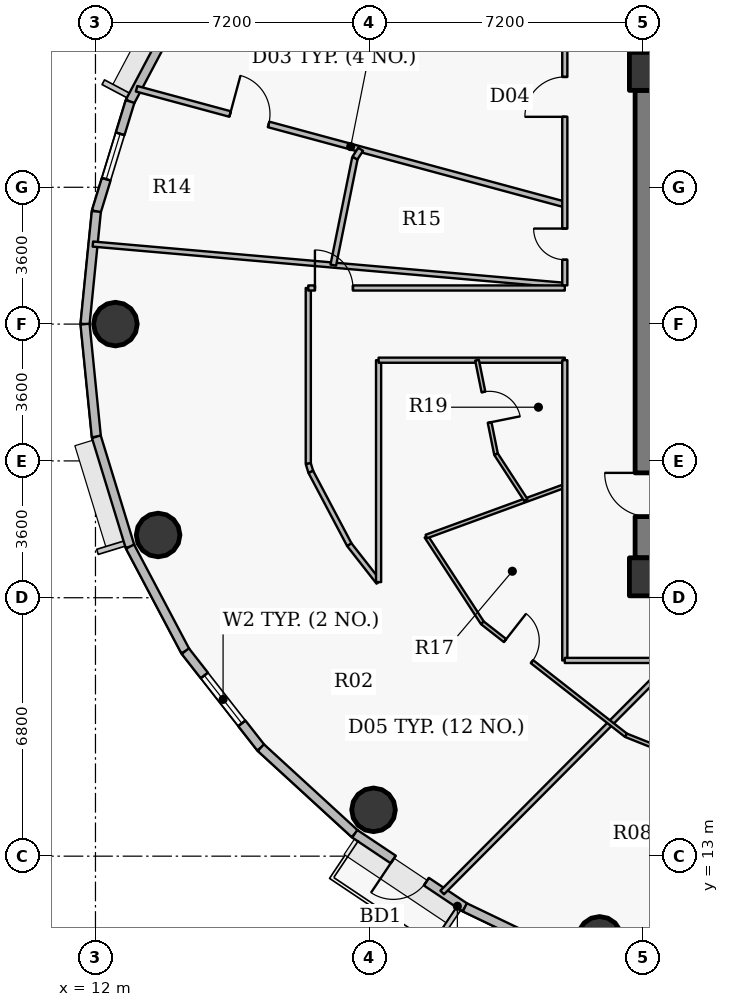
"""IFC4 building model, lengths in metres.
Left out: names, types, materials, properties, quantities, classifications, styles, units other than length and angle.
Written with IfcOpenShell. Run it as: python <this file> out.ifc"""

import sys

from ifc_helpers import new_model, si_unit, direction, frame, frame_2d, origin, origin_2d, place, context, subcontext, project, spatial, rectangle, hollow_circle, extrude, source, transform, mapped, element, fill, save


model = new_model("IFC4")
c1 = context("Model", 3, precision=1e-05, world=origin(), true_north=direction((0.0, 1.0)))
c2 = subcontext(c1, "Body", "Model", "MODEL_VIEW")
j1 = project(units=[si_unit("LENGTHUNIT", "METRE"), si_unit("PLANEANGLEUNIT", "RADIAN")], contexts=[c1])
p1 = place(None, origin())
s1 = spatial("IfcSite", under=j1, at=p1, CompositionType="ELEMENT")
p2 = place(p1, origin())
s2 = spatial("IfcBuilding", under=s1, at=p2, CompositionType="ELEMENT")
p3 = place(p2, frame((0.0, 0.0, 244.05)))
s3 = spatial("IfcBuildingStorey", under=s2, at=p3, CompositionType="ELEMENT", Elevation=244.05)
for number, where, z_axis, x_axis in (
    (1, (26.55, 20.35, 0.0), (0.0, 0.0, 1.0), (1.0, 0.0, 0.0)),
    (2, (26.55, 33.65, 0.0), (0.0, 0.0, 1.0), (1.0, 0.0, 0.0)),
):
    element("IfcColumn", number, at=place(p3, frame(where, z_axis=z_axis, x_axis=x_axis)), inside=s3, PredefinedType="COLUMN", context=c2, shape_type="SweptSolid", body=[
        extrude(rectangle(XDim=1.0, YDim=1.0, at=origin_2d()), origin(), (0.0, 0.0, 1.0), 3.75),
    ])
p4 = place(p3, frame((26.55, 20.85, 0.0), z_axis=(0.0, 0.0, 1.0), x_axis=(0.0, 1.0, 0.0)))
e3 = element("IfcWall", 3, at=p4, inside=s3, PredefinedType="SHEAR", context=c2, shape_type="SweptSolid", body=[
    extrude(rectangle(XDim=12.3, YDim=0.7, at=frame_2d((6.15, 0.0))), origin(), (0.0, 0.0, 1.0), 3.05),
])
p5 = place(p4, frame((1.085, 0.0, 0.0)))
e4 = element("IfcOpeningElement", 4, at=p5, cuts=e3, PredefinedType="OPENING", context=c2, shape_type="SweptSolid", body=[
    extrude(rectangle(XDim=1.15, YDim=2.15, at=origin_2d()), frame((0.575, 0.36, 1.075), z_axis=(0.0, -1.0, 0.0), x_axis=(1.0, 0.0, 0.0)), (0.0, 0.0, 1.0), 0.72),
])
for number, where, z_axis, x_axis in (
    (5, (12.525, 27.0, 0.0), (0.0, 0.0, 1.0), (1.0, 0.0, 0.0)),
    (6, (13.649, 21.451, 0.0), (0.0, 0.0, 1.0), (1.0, 0.0, 0.0)),
    (7, (19.317, 14.219, 0.0), (0.0, 0.0, 1.0), (1.0, 0.0, 0.0)),
    (8, (25.265, 10.836, 0.0), (0.0, 0.0, 1.0), (1.0, 0.0, 0.0)),
):
    element("IfcColumn", number, at=place(p3, frame(where, z_axis=z_axis, x_axis=x_axis)), inside=s3, PredefinedType="COLUMN", context=c2, shape_type="SweptSolid", body=[
        extrude(hollow_circle(Radius=0.575, WallThickness=0.036, at=origin_2d()), origin(), (0.0, 0.0, 1.0), 3.75),
    ])
p6 = place(p3, frame((12.91, 32.856, 0.0), z_axis=(0.0, 0.0, 1.0), x_axis=(0.46766049993, 0.883908172157, 0.0)))
e9 = element("IfcWall", 9, at=p6, inside=s3, PredefinedType="SOLIDWALL", context=c2, shape_type="SweptSolid", body=[
    extrude(rectangle(XDim=3.11, YDim=0.24, at=frame_2d((1.555, 0.0))), origin(), (0.0, 0.0, 1.0), 3.5),
])
p7 = place(p3, frame((12.023, 29.964, 0.0), z_axis=(0.0, 0.0, 1.0), x_axis=(0.293132907334, 0.95607170162, 0.0)))
e10 = element("IfcWall", 10, at=p7, inside=s3, PredefinedType="SOLIDWALL", context=c2, shape_type="SweptSolid", body=[
    extrude(rectangle(XDim=3.025, YDim=0.24, at=frame_2d((1.512, 0.0))), origin(), (0.0, 0.0, 1.0), 3.5),
])
p8 = place(p7, frame((0.887, 0.0, 0.9)))
e11 = element("IfcOpeningElement", 11, at=p8, cuts=e10, PredefinedType="OPENING", context=c2, shape_type="SweptSolid", body=[
    extrude(rectangle(XDim=1.25, YDim=1.65, at=origin_2d()), frame((0.625, 0.13, 0.825), z_axis=(0.0, -1.0, 0.0), x_axis=(1.0, 0.0, 0.0)), (0.0, 0.0, 1.0), 0.26),
])
for number, where, z_axis, x_axis in (
    (12, (11.725, 27.0, 0.0), (0.0, 0.0, 1.0), (0.1, 0.995, 0.0)),
    (13, (12.023, 24.036, 0.0), (0.0, 0.0, 1.0), (-0.1, 0.995, 0.0)),
):
    element("IfcWall", number, at=place(p3, frame(where, z_axis=z_axis, x_axis=x_axis)), inside=s3, PredefinedType="SOLIDWALL", context=c2, shape_type="SweptSolid", body=[
        extrude(rectangle(XDim=2.979, YDim=0.24, at=frame_2d((1.489, 0.0))), origin(), (0.0, 0.0, 1.0), 3.5),
    ])
p9 = place(p3, frame((12.91, 21.144, 0.0), z_axis=(0.0, 0.0, 1.0), x_axis=(-0.293132907334, 0.95607170162, 0.0)))
e14 = element("IfcWall", 14, at=p9, inside=s3, PredefinedType="SOLIDWALL", context=c2, shape_type="SweptSolid", body=[
    extrude(rectangle(XDim=3.025, YDim=0.24, at=frame_2d((1.512, 0.0))), origin(), (0.0, 0.0, 1.0), 3.5),
])
p10 = place(p3, frame((14.364, 18.395, 0.0), z_axis=(0.0, 0.0, 1.0), x_axis=(-0.46766049993, 0.883908172157, 0.0)))
e15 = element("IfcWall", 15, at=p10, inside=s3, PredefinedType="SOLIDWALL", context=c2, shape_type="SweptSolid", body=[
    extrude(rectangle(XDim=3.11, YDim=0.24, at=frame_2d((1.555, 0.0))), origin(), (0.0, 0.0, 1.0), 3.5),
])
p11 = place(p3, frame((16.352, 15.855, 0.0), z_axis=(0.0, 0.0, 1.0), x_axis=(-0.616312344705, 0.787501805562, 0.0)))
e16 = element("IfcWall", 16, at=p11, inside=s3, PredefinedType="SOLIDWALL", context=c2, shape_type="SweptSolid", body=[
    extrude(rectangle(XDim=3.225, YDim=0.24, at=frame_2d((1.612, 0.0))), origin(), (0.0, 0.0, 1.0), 3.5),
])
p12 = place(p11, frame((0.812, 0.0, 0.9)))
e17 = element("IfcOpeningElement", 17, at=p12, cuts=e16, PredefinedType="OPENING", context=c2, shape_type="SweptSolid", body=[
    extrude(rectangle(XDim=1.6, YDim=1.75, at=origin_2d()), frame((0.8, 0.13, 0.875), z_axis=(0.0, -1.0, 0.0), x_axis=(1.0, 0.0, 0.0)), (0.0, 0.0, 1.0), 0.26),
])
p13 = place(p3, frame((18.824, 13.589, 0.0), z_axis=(0.0, 0.0, 1.0), x_axis=(-0.737123922599, 0.675757591694, 0.0)))
e18 = element("IfcWall", 18, at=p13, inside=s3, PredefinedType="SOLIDWALL", context=c2, shape_type="SweptSolid", body=[
    extrude(rectangle(XDim=3.354, YDim=0.24, at=frame_2d((1.677, 0.0))), origin(), (0.0, 0.0, 1.0), 3.5),
])
p14 = place(p3, frame((21.72, 11.652, 0.0), z_axis=(0.0, 0.0, 1.0), x_axis=(-0.831262496074, 0.555880079352, 0.0)))
e19 = element("IfcWall", 19, at=p14, inside=s3, PredefinedType="SOLIDWALL", context=c2, shape_type="SweptSolid", body=[
    extrude(rectangle(XDim=3.484, YDim=0.24, at=frame_2d((1.742, 0.0))), origin(), (0.0, 0.0, 1.0), 3.5),
])
p15 = place(p14, frame((1.217, 0.0, 0.0)))
e20 = element("IfcOpeningElement", 20, at=p15, cuts=e19, PredefinedType="OPENING", context=c2, shape_type="SweptSolid", body=[
    extrude(rectangle(XDim=1.05, YDim=2.15, at=origin_2d()), frame((0.525, 0.13, 1.075), z_axis=(0.0, -1.0, 0.0), x_axis=(1.0, 0.0, 0.0)), (0.0, 0.0, 1.0), 0.26),
])
p16 = place(p3, frame((24.969, 10.094, 0.0), z_axis=(0.0, 0.0, 1.0), x_axis=(-0.901598104751, 0.432574684313, 0.0)))
e21 = element("IfcWall", 21, at=p16, inside=s3, PredefinedType="SOLIDWALL", context=c2, shape_type="SweptSolid", body=[
    extrude(rectangle(XDim=3.604, YDim=0.24, at=frame_2d((1.802, 0.0))), origin(), (0.0, 0.0, 1.0), 3.5),
])
p17 = place(p3, frame((11.932, 29.106, 0.0), z_axis=(0.0, 0.0, 1.0), x_axis=(0.996194886619, -0.08715358784, 0.0)))
e22 = element("IfcWall", 22, at=p17, inside=s3, PredefinedType="PARTITIONING", context=c2, shape_type="SweptSolid", body=[
    extrude(rectangle(XDim=12.466, YDim=0.135, at=frame_2d((6.233, 0.0))), origin(), (0.0, 0.0, 1.0), 2.985),
])
p18 = place(p3, frame((13.082, 33.192, 0.0), z_axis=(0.0, 0.0, 1.0), x_axis=(0.965379480797, -0.26084949311, 0.0)))
e23 = element("IfcWall", 23, at=p18, inside=s3, PredefinedType="PARTITIONING", context=c2, shape_type="SweptSolid", body=[
    extrude(rectangle(XDim=11.672, YDim=0.15, at=frame_2d((5.836, 0.0))), origin(), (0.0, 0.0, 1.0), 2.985),
])
p19 = place(p18, frame((2.549, 0.0, 0.0)))
e24 = element("IfcOpeningElement", 24, at=p19, cuts=e23, PredefinedType="OPENING", context=c2, shape_type="SweptSolid", body=[
    extrude(rectangle(XDim=1.05, YDim=2.15, at=origin_2d()), frame((0.525, 0.085, 1.075), z_axis=(0.0, -1.0, 0.0), x_axis=(1.0, 0.0, 0.0)), (0.0, 0.0, 1.0), 0.17),
])
p20 = place(p3, frame((17.6, 23.328, 0.0), z_axis=(0.0, 0.0, 1.0), x_axis=(0.0, 1.0, 0.0)))
e25 = element("IfcWall", 25, at=p20, inside=s3, PredefinedType="PARTITIONING", context=c2, shape_type="SweptSolid", body=[
    extrude(rectangle(XDim=4.622, YDim=0.135, at=frame_2d((2.311, 0.0))), origin(), (0.0, 0.0, 1.0), 2.935),
])
p21 = place(p3, frame((17.6, 23.328, 0.0), z_axis=(0.0, 0.0, 1.0), x_axis=(0.292875000845, -0.956150738053, 0.0)))
e26 = element("IfcWall", 26, at=p21, inside=s3, PredefinedType="PARTITIONING", context=c2, shape_type="SweptSolid", body=[
    extrude(rectangle(XDim=0.227, YDim=0.135, at=frame_2d((0.113, 0.0))), origin(), (0.0, 0.0, 1.0), 3.5),
])
p22 = place(p3, frame((17.6, 27.95, 0.0), z_axis=(0.0, 0.0, 1.0), x_axis=(1.0, 0.0, 0.0)))
e27 = element("IfcWall", 27, at=p22, inside=s3, PredefinedType="PARTITIONING", context=c2, shape_type="SweptSolid", body=[
    extrude(rectangle(XDim=6.75, YDim=0.135, at=frame_2d((3.375, 0.0))), origin(), (0.0, 0.0, 1.0), 3.5),
])
p23 = place(p22, frame((0.175, 0.0, 0.0)))
e28 = element("IfcOpeningElement", 28, at=p23, cuts=e27, PredefinedType="OPENING", context=c2, shape_type="SweptSolid", body=[
    extrude(rectangle(XDim=1.0, YDim=2.15, at=origin_2d()), frame((0.5, 0.078, 1.075), z_axis=(0.0, -1.0, 0.0), x_axis=(1.0, 0.0, 0.0)), (0.0, 0.0, 1.0), 0.155),
])
p24 = place(p3, frame((17.667, 23.111, 0.0), z_axis=(0.0, 0.0, 1.0), x_axis=(0.467675622269, -0.883900171024, 0.0)))
e29 = element("IfcWall", 29, at=p24, inside=s3, PredefinedType="PARTITIONING", context=c2, shape_type="SweptSolid", body=[
    extrude(rectangle(XDim=2.168, YDim=0.135, at=frame_2d((1.084, 0.0))), origin(), (0.0, 0.0, 1.0), 2.935),
])
p25 = place(p3, frame((18.258, 28.552, 0.0), z_axis=(0.0, 0.0, 1.0), x_axis=(0.198206962436, 0.980160191011, 0.0)))
e30 = element("IfcWall", 30, at=p25, inside=s3, PredefinedType="PARTITIONING", context=c2, shape_type="SweptSolid", body=[
    extrude(rectangle(XDim=2.874, YDim=0.15, at=frame_2d((1.437, 0.0))), origin(), (0.0, 0.0, 1.0), 3.5),
])
p26 = place(p3, frame((18.681, 21.194, 0.0), z_axis=(0.0, 0.0, 1.0), x_axis=(0.616239706802, -0.787558647823, 0.0)))
e31 = element("IfcWall", 31, at=p26, inside=s3, PredefinedType="PARTITIONING", context=c2, shape_type="SweptSolid", body=[
    extrude(rectangle(XDim=1.248, YDim=0.135, at=frame_2d((0.624, 0.0))), origin(), (0.0, 0.0, 1.0), 3.5),
])
p27 = place(p3, frame((18.828, 31.369, 0.0), z_axis=(0.0, 0.0, 1.0), x_axis=(0.545861595592, 0.837875359739, 0.0)))
e32 = element("IfcWall", 32, at=p27, inside=s3, PredefinedType="PARTITIONING", context=c2, shape_type="SweptSolid", body=[
    extrude(rectangle(XDim=0.275, YDim=0.15, at=frame_2d((0.138, 0.0))), origin(), (0.0, 0.0, 1.0), 3.5),
])
p28 = place(p3, frame((19.45, 20.211, 0.0), z_axis=(0.0, 0.0, 1.0), x_axis=(0.0, 1.0, 0.0)))
e33 = element("IfcWall", 33, at=p28, inside=s3, PredefinedType="PARTITIONING", context=c2, shape_type="SweptSolid", body=[
    extrude(rectangle(XDim=5.839, YDim=0.135, at=frame_2d((2.919, 0.0))), origin(), (0.0, 0.0, 1.0), 2.935),
])
p29 = place(p3, frame((19.45, 26.05, 0.0), z_axis=(0.0, 0.0, 1.0), x_axis=(1.0, 0.0, 0.0)))
e34 = element("IfcWall", 34, at=p29, inside=s3, PredefinedType="PARTITIONING", context=c2, shape_type="SweptSolid", body=[
    extrude(rectangle(XDim=4.9, YDim=0.135, at=frame_2d((2.45, 0.0))), origin(), (0.0, 0.0, 1.0), 3.5),
])
p30 = place(p3, frame((20.704, 21.41, 0.0), z_axis=(0.0, 0.0, 1.0), x_axis=(0.545431767871, -0.838155228223, 0.0)))
e35 = element("IfcWall", 35, at=p30, inside=s3, PredefinedType="PARTITIONING", context=c2, shape_type="SweptSolid", body=[
    extrude(rectangle(XDim=2.709, YDim=0.1, at=frame_2d((1.354, 0.0))), origin(), (0.0, 0.0, 1.0), 3.5),
])
p31 = place(p3, frame((20.704, 21.41, 0.0), z_axis=(0.0, 0.0, 1.0), x_axis=(0.939230218299, 0.343287921481, 0.0)))
e36 = element("IfcWall", 36, at=p31, inside=s3, PredefinedType="PARTITIONING", context=c2, shape_type="SweptSolid", body=[
    extrude(rectangle(XDim=3.882, YDim=0.1, at=frame_2d((1.941, 0.0))), origin(), (0.0, 0.0, 1.0), 3.5),
])
p32 = place(p3, frame((21.124, 12.045, 0.0), z_axis=(0.0, 0.0, 1.0), x_axis=(0.70521888308, 0.708989652215, 0.0)))
e37 = element("IfcWall", 37, at=p32, inside=s3, PredefinedType="PARTITIONING", context=c2, shape_type="SweptSolid", body=[
    extrude(rectangle(XDim=8.611, YDim=0.135, at=frame_2d((4.306, 0.0))), origin(), (0.0, 0.0, 1.0), 2.985),
])
p33 = place(p3, frame((22.04, 26.05, 0.0), z_axis=(0.0, 0.0, 1.0), x_axis=(0.198273230268, -0.980146788067, 0.0)))
e38 = element("IfcWall", 38, at=p33, inside=s3, PredefinedType="PARTITIONING", context=c2, shape_type="SweptSolid", body=[
    extrude(rectangle(XDim=2.524, YDim=0.1, at=frame_2d((1.262, 0.0))), origin(), (0.0, 0.0, 1.0), 2.935),
])
p34 = place(p33, frame((0.852, 0.0, 0.0)))
e39 = element("IfcOpeningElement", 39, at=p34, cuts=e38, PredefinedType="OPENING", context=c2, shape_type="SweptSolid", body=[
    extrude(rectangle(XDim=0.82, YDim=2.1, at=origin_2d()), frame((0.41, 0.06, 1.05), z_axis=(0.0, -1.0, 0.0), x_axis=(1.0, 0.0, 0.0)), (0.0, 0.0, 1.0), 0.12),
])
p35 = place(p3, frame((22.182, 19.139, 0.0), z_axis=(0.0, 0.0, 1.0), x_axis=(0.787386902975, -0.616459134917, 0.0)))
e40 = element("IfcWall", 40, at=p35, inside=s3, PredefinedType="PARTITIONING", context=c2, shape_type="SweptSolid", body=[
    extrude(rectangle(XDim=4.799, YDim=0.1, at=frame_2d((2.399, 0.0))), origin(), (0.0, 0.0, 1.0), 2.935),
])
p36 = place(p35, frame((0.757, 0.0, 0.0)))
e41 = element("IfcOpeningElement", 41, at=p36, cuts=e40, PredefinedType="OPENING", context=c2, shape_type="SweptSolid", body=[
    extrude(rectangle(XDim=0.9, YDim=2.1, at=origin_2d()), frame((0.45, 0.06, 1.05), z_axis=(0.0, -1.0, 0.0), x_axis=(1.0, 0.0, 0.0)), (0.0, 0.0, 1.0), 0.12),
])
p37 = place(p3, frame((22.541, 23.576, 0.0), z_axis=(0.0, 0.0, 1.0), x_axis=(0.545399208044, -0.838176415717, 0.0)))
e42 = element("IfcWall", 42, at=p37, inside=s3, PredefinedType="PARTITIONING", context=c2, shape_type="SweptSolid", body=[
    extrude(rectangle(XDim=1.441, YDim=0.1, at=frame_2d((0.72, 0.0))), origin(), (0.0, 0.0, 1.0), 2.935),
])
p38 = place(p3, frame((24.35, 18.15, 0.0), z_axis=(0.0, 0.0, 1.0), x_axis=(0.0, 1.0, 0.0)))
e43 = element("IfcWall", 43, at=p38, inside=s3, PredefinedType="PARTITIONING", context=c2, shape_type="SweptSolid", body=[
    extrude(rectangle(XDim=7.9, YDim=0.135, at=frame_2d((3.95, 0.0))), origin(), (0.0, 0.0, 1.0), 2.935),
])
p39 = place(p3, frame((24.35, 18.15, 0.0), z_axis=(0.0, 0.0, 1.0), x_axis=(1.0, 0.0, 0.0)))
e44 = element("IfcWall", 44, at=p39, inside=s3, PredefinedType="PARTITIONING", context=c2, shape_type="SweptSolid", body=[
    extrude(rectangle(XDim=23.85, YDim=0.135, at=frame_2d((11.925, 0.0))), origin(), (0.0, 0.0, 1.0), 2.935),
])
p40 = place(p39, frame((10.168, 0.0, 0.0)))
e45 = element("IfcOpeningElement", 45, at=p40, cuts=e44, PredefinedType="OPENING", context=c2, shape_type="SweptSolid", body=[
    extrude(rectangle(XDim=1.0, YDim=2.15, at=origin_2d()), frame((0.5, 0.078, 1.075), z_axis=(0.0, -1.0, 0.0), x_axis=(1.0, 0.0, 0.0)), (0.0, 0.0, 1.0), 0.155),
])
p41 = place(p3, frame((24.35, 28.019, 0.0), z_axis=(0.0, 0.0, 1.0), x_axis=(0.0, 1.0, 0.0)))
e46 = element("IfcWall", 46, at=p41, inside=s3, PredefinedType="PARTITIONING", context=c2, shape_type="SweptSolid", body=[
    extrude(rectangle(XDim=7.831, YDim=0.135, at=frame_2d((3.916, 0.0))), origin(), (0.0, 0.0, 1.0), 2.935),
])
p42 = place(p41, frame((4.435, 0.0, 0.0)))
e47 = element("IfcOpeningElement", 47, at=p42, cuts=e46, PredefinedType="OPENING", context=c2, shape_type="SweptSolid", body=[
    extrude(rectangle(XDim=1.05, YDim=2.15, at=origin_2d()), frame((0.525, 0.078, 1.075), z_axis=(0.0, -1.0, 0.0), x_axis=(1.0, 0.0, 0.0)), (0.0, 0.0, 1.0), 0.155),
])
p43 = place(p41, frame((0.674, 0.0, 0.0)))
e48 = element("IfcOpeningElement", 48, at=p43, cuts=e46, PredefinedType="OPENING", context=c2, shape_type="SweptSolid", body=[
    extrude(rectangle(XDim=0.82, YDim=2.1, at=origin_2d()), frame((0.41, 0.078, 1.05), z_axis=(0.0, -1.0, 0.0), x_axis=(1.0, 0.0, 0.0)), (0.0, 0.0, 1.0), 0.155),
])
p44 = place(p3, frame((25.961, 16.181, 0.0), z_axis=(0.0, 0.0, 1.0), x_axis=(0.928800189679, -0.370580905678, 0.0)))
e49 = element("IfcWall", 49, at=p44, inside=s3, PredefinedType="PARTITIONING", context=c2, shape_type="SweptSolid", body=[
    extrude(rectangle(XDim=4.991, YDim=0.1, at=frame_2d((2.496, 0.0))), origin(), (0.0, 0.0, 1.0), 2.935),
])
p45 = place(p44, frame((3.201, 0.0, 0.0)))
e50 = element("IfcOpeningElement", 50, at=p45, cuts=e49, PredefinedType="OPENING", context=c2, shape_type="SweptSolid", body=[
    extrude(rectangle(XDim=0.9, YDim=2.1, at=origin_2d()), frame((0.45, 0.06, 1.05), z_axis=(0.0, -1.0, 0.0), x_axis=(1.0, 0.0, 0.0)), (0.0, 0.0, 1.0), 0.12),
])
p46 = place(p3, frame((27.04, 34.0, 0.0), z_axis=(0.0, 0.0, 1.0), x_axis=(-1.0, 0.0, 0.0)))
e51 = element("IfcWall", 51, at=p46, inside=s3, PredefinedType="PARTITIONING", context=c2, shape_type="SweptSolid", body=[
    extrude(rectangle(XDim=0.84, YDim=0.135, at=frame_2d((0.42, 0.0))), origin(), (0.0, 0.0, 1.0), 2.935),
])
p47 = place(p3, frame((26.2, 33.692, 0.0), z_axis=(0.0, 0.0, 1.0), x_axis=(0.0, -1.0, 0.0)))
e52 = element("IfcWall", 52, at=p47, inside=s3, PredefinedType="PARTITIONING", context=c2, shape_type="SweptSolid", body=[
    extrude(rectangle(XDim=0.532, YDim=0.135, at=frame_2d((0.266, 0.0))), origin(), (0.0, 0.0, 1.0), 3.5),
])
p48 = place(p3, frame((26.2, 20.84, 0.0), z_axis=(0.0, 0.0, 1.0), x_axis=(0.0, -1.0, 0.0)))
e53 = element("IfcWall", 53, at=p48, inside=s3, PredefinedType="PARTITIONING", context=c2, shape_type="SweptSolid", body=[
    extrude(rectangle(XDim=0.84, YDim=0.135, at=frame_2d((0.42, 0.0))), origin(), (0.0, 0.0, 1.0), 3.185),
])
p49 = place(p3, frame((26.508, 20.0, 0.0), z_axis=(0.0, 0.0, 1.0), x_axis=(1.0, 0.0, 0.0)))
e54 = element("IfcWall", 54, at=p49, inside=s3, PredefinedType="PARTITIONING", context=c2, shape_type="SweptSolid", body=[
    extrude(rectangle(XDim=0.532, YDim=0.135, at=frame_2d((0.266, 0.0))), origin(), (0.0, 0.0, 1.0), 2.935),
])
m1 = source(origin(), c2, "Body", "SweptSolid", [
    extrude(rectangle(XDim=1.25, YDim=1.65, at=origin_2d()), frame((0.625, 0.03, 0.825), z_axis=(0.0, -1.0, 0.0), x_axis=(1.0, 0.0, 0.0)), (0.0, 0.0, 1.0), 0.06),
])
p50 = place(p8, origin())
e55 = element("IfcWindow", 55, at=p50, inside=s3, PartitioningType="SINGLE_PANEL", PredefinedType="WINDOW", context=c2, shape_type="MappedRepresentation", body=[
    mapped(m1, transform((0.0, 0.0, 0.0), x_axis=(1.0, 0.0, 0.0), y_axis=(0.0, 1.0, 0.0), z_axis=(0.0, 0.0, 1.0), scale=1.0)),
])
fill(e11, e55)
m2 = source(origin(), c2, "Body", "SweptSolid", [
    extrude(rectangle(XDim=1.6, YDim=1.75, at=origin_2d()), frame((0.8, 0.03, 0.875), z_axis=(0.0, -1.0, 0.0), x_axis=(1.0, 0.0, 0.0)), (0.0, 0.0, 1.0), 0.06),
])
p51 = place(p12, origin())
e56 = element("IfcWindow", 56, at=p51, inside=s3, PartitioningType="DOUBLE_PANEL_VERTICAL", PredefinedType="WINDOW", context=c2, shape_type="MappedRepresentation", body=[
    mapped(m2, transform((0.0, 0.0, 0.0), x_axis=(1.0, 0.0, 0.0), y_axis=(0.0, 1.0, 0.0), z_axis=(0.0, 0.0, 1.0), scale=1.0)),
])
fill(e17, e56)
m3 = source(origin(), c2, "Body", "SweptSolid", [
    extrude(rectangle(XDim=1.05, YDim=2.15, at=origin_2d()), frame((0.525, 0.025, 1.075), z_axis=(0.0, -1.0, 0.0), x_axis=(1.0, 0.0, 0.0)), (0.0, 0.0, 1.0), 0.05),
])
p52 = place(p15, origin())
e57 = element("IfcDoor", 57, at=p52, inside=s3, OperationType="SINGLE_SWING_RIGHT", PredefinedType="DOOR", context=c2, shape_type="MappedRepresentation", body=[
    mapped(m3, transform((0.0, 0.0, 0.0), x_axis=(1.0, 0.0, 0.0), y_axis=(0.0, 1.0, 0.0), z_axis=(0.0, 0.0, 1.0), scale=1.0)),
])
fill(e20, e57)
m4 = source(origin(), c2, "Body", "SweptSolid", [
    extrude(rectangle(XDim=1.15, YDim=2.15, at=origin_2d()), frame((0.575, 0.025, 1.075), z_axis=(0.0, -1.0, 0.0), x_axis=(1.0, 0.0, 0.0)), (0.0, 0.0, 1.0), 0.05),
])
p53 = place(p5, origin())
e58 = element("IfcDoor", 58, at=p53, inside=s3, OperationType="SINGLE_SWING_RIGHT", PredefinedType="DOOR", context=c2, shape_type="MappedRepresentation", body=[
    mapped(m4, transform((0.0, 0.0, 0.0), x_axis=(1.0, 0.0, 0.0), y_axis=(0.0, 1.0, 0.0), z_axis=(0.0, 0.0, 1.0), scale=1.0)),
])
fill(e4, e58)
m5 = source(origin(), c2, "Body", "SweptSolid", [
    extrude(rectangle(XDim=1.0, YDim=2.15, at=origin_2d()), frame((0.5, 0.025, 1.075), z_axis=(0.0, -1.0, 0.0), x_axis=(1.0, 0.0, 0.0)), (0.0, 0.0, 1.0), 0.05),
])
p54 = place(p23, origin())
e59 = element("IfcDoor", 59, at=p54, inside=s3, OperationType="SINGLE_SWING_LEFT", PredefinedType="DOOR", context=c2, shape_type="MappedRepresentation", body=[
    mapped(m5, transform((0.0, 0.0, 0.0), x_axis=(1.0, 0.0, 0.0), y_axis=(0.0, 1.0, 0.0), z_axis=(0.0, 0.0, 1.0), scale=1.0)),
])
fill(e28, e59)
m6 = source(origin(), c2, "Body", "SweptSolid", [
    extrude(rectangle(XDim=0.82, YDim=2.1, at=origin_2d()), frame((0.41, 0.025, 1.05), z_axis=(0.0, -1.0, 0.0), x_axis=(1.0, 0.0, 0.0)), (0.0, 0.0, 1.0), 0.05),
])
p55 = place(p34, origin())
e60 = element("IfcDoor", 60, at=p55, inside=s3, OperationType="SINGLE_SWING_RIGHT", PredefinedType="DOOR", context=c2, shape_type="MappedRepresentation", body=[
    mapped(m6, transform((0.0, 0.0, 0.0), x_axis=(1.0, 0.0, 0.0), y_axis=(0.0, 1.0, 0.0), z_axis=(0.0, 0.0, 1.0), scale=1.0)),
])
fill(e39, e60)
m7 = source(origin(), c2, "Body", "SweptSolid", [
    extrude(rectangle(XDim=0.9, YDim=2.1, at=origin_2d()), frame((0.45, 0.025, 1.05), z_axis=(0.0, -1.0, 0.0), x_axis=(1.0, 0.0, 0.0)), (0.0, 0.0, 1.0), 0.05),
])
p56 = place(p36, origin())
e61 = element("IfcDoor", 61, at=p56, inside=s3, OperationType="SINGLE_SWING_LEFT", PredefinedType="DOOR", context=c2, shape_type="MappedRepresentation", body=[
    mapped(m7, transform((0.0, 0.0, 0.0), x_axis=(1.0, 0.0, 0.0), y_axis=(0.0, 1.0, 0.0), z_axis=(0.0, 0.0, 1.0), scale=1.0)),
])
fill(e41, e61)
p57 = place(p42, origin())
e62 = element("IfcDoor", 62, at=p57, inside=s3, OperationType="SINGLE_SWING_LEFT", PredefinedType="DOOR", context=c2, shape_type="MappedRepresentation", body=[
    mapped(m3, transform((0.0, 0.0, 0.0), x_axis=(1.0, 0.0, 0.0), y_axis=(0.0, 1.0, 0.0), z_axis=(0.0, 0.0, 1.0), scale=1.0)),
])
fill(e47, e62)
p58 = place(p43, origin())
e63 = element("IfcDoor", 63, at=p58, inside=s3, OperationType="SINGLE_SWING_RIGHT", PredefinedType="DOOR", context=c2, shape_type="MappedRepresentation", body=[
    mapped(m6, transform((0.0, 0.0, 0.0), x_axis=(1.0, 0.0, 0.0), y_axis=(0.0, 1.0, 0.0), z_axis=(0.0, 0.0, 1.0), scale=1.0)),
])
fill(e48, e63)
p59 = place(p19, origin())
e64 = element("IfcDoor", 64, at=p59, inside=s3, OperationType="SINGLE_SWING_LEFT", PredefinedType="DOOR", context=c2, shape_type="MappedRepresentation", body=[
    mapped(m3, transform((0.0, 0.0, 0.0), x_axis=(1.0, 0.0, 0.0), y_axis=(0.0, 1.0, 0.0), z_axis=(0.0, 0.0, 1.0), scale=1.0)),
])
fill(e24, e64)
save(model, sys.argv[1])
